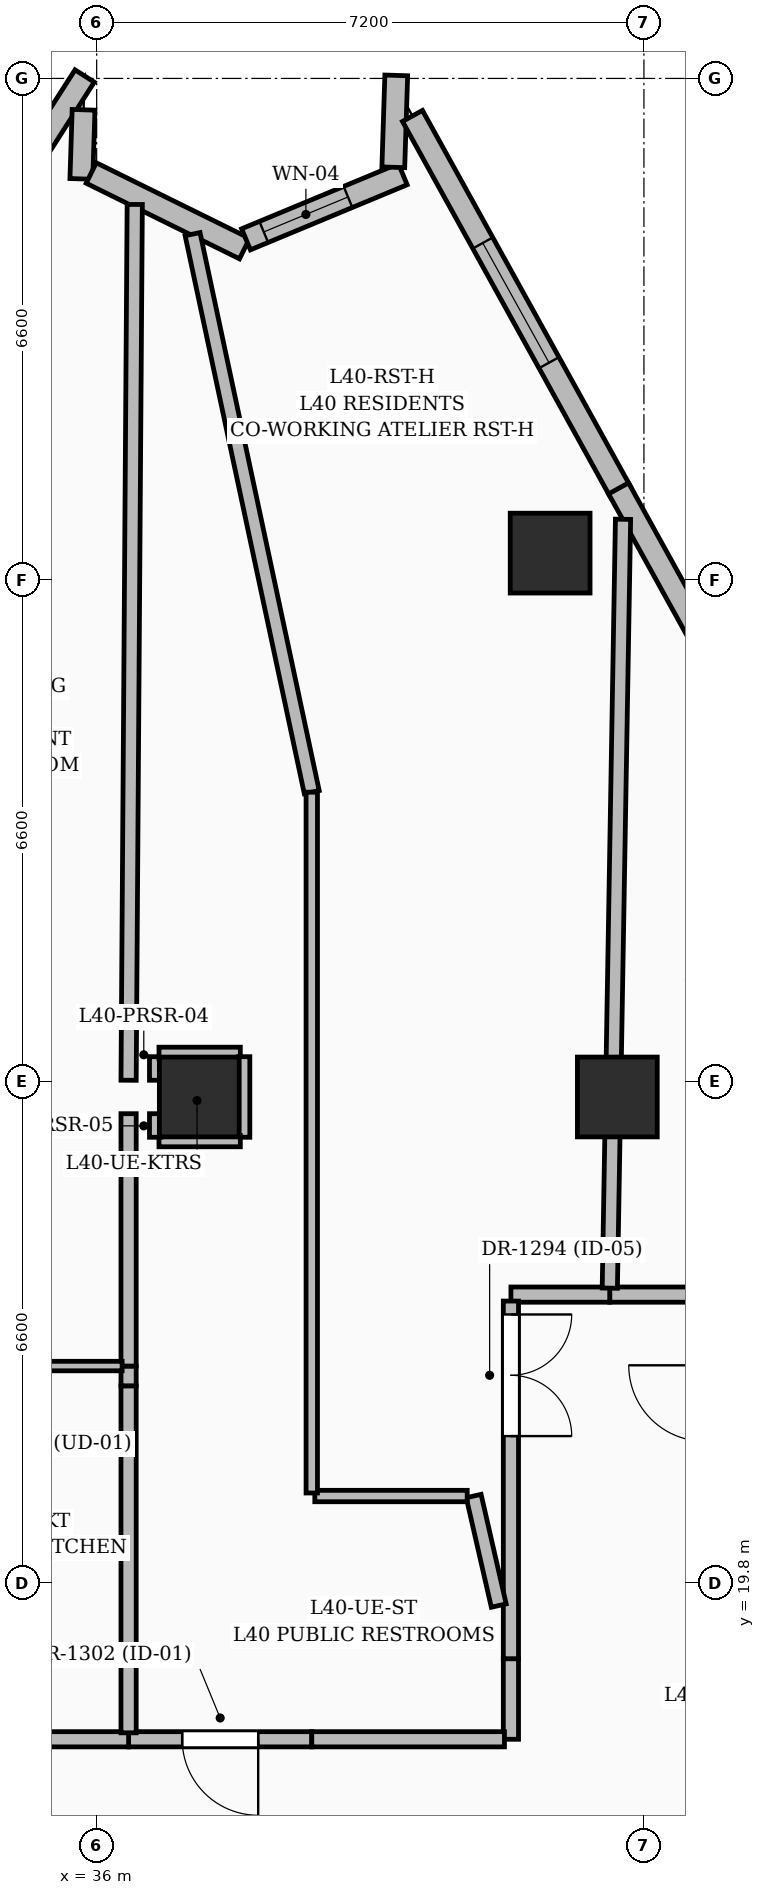
"""IFC4 building model, lengths in metres.
Left out: names, types, materials, properties, quantities, classifications, styles, units other than length and angle.
Written with IfcOpenShell. Run it as: python <this file> out.ifc"""

import sys

from ifc_helpers import new_model, si_unit, direction, frame, frame_2d, origin, origin_2d, place, context, subcontext, project, spatial, rectangle, extrude, element, fill, save


model = new_model("IFC4")
c1 = context("Model", 3, precision=1e-05, world=origin(), true_north=direction((0.0, 1.0)))
c2 = subcontext(c1, "Body", "Model", "MODEL_VIEW")
j1 = project(units=[si_unit("LENGTHUNIT", "METRE"), si_unit("PLANEANGLEUNIT", "RADIAN")], contexts=[c1])
p1 = place(None, origin())
s1 = spatial("IfcSite", under=j1, at=p1, CompositionType="ELEMENT")
p2 = place(p1, origin())
s2 = spatial("IfcBuilding", under=s1, at=p2, CompositionType="ELEMENT")
p3 = place(p2, frame((0.0, 0.0, 157.2)))
s3 = spatial("IfcBuildingStorey", under=s2, at=p3, CompositionType="ELEMENT", Elevation=157.2)
for number, where, z_axis, x_axis in (
    (1, (42.85, 26.2, 0.0), (0.0, 0.0, 1.0), (1.0, 0.0, 0.0)),
    (2, (37.35, 26.2, 0.0), (0.0, 0.0, 1.0), (1.0, 0.0, 0.0)),
    (3, (41.966, 33.355, 0.0), (0.0, 0.0, 1.0), (1.0, 0.0, 0.0)),
):
    element("IfcColumn", number, at=place(p3, frame(where, z_axis=z_axis, x_axis=x_axis)), inside=s3, PredefinedType="COLUMN", context=c2, shape_type="SweptSolid", body=[
        extrude(rectangle(XDim=1.05, YDim=1.05, at=origin_2d()), origin(), (0.0, 0.0, 1.0), 3.6),
    ])
p4 = place(p3, frame((32.455, 34.345, 0.0), z_axis=(0.0, 0.0, 1.0), x_axis=(0.539489448276, 0.841992360535, 0.0)))
e4 = element("IfcWall", 4, at=p4, inside=s3, PredefinedType="SOLIDWALL", context=c2, shape_type="SweptSolid", body=[
    extrude(rectangle(XDim=6.279, YDim=0.3, at=frame_2d((3.14, 0.0))), origin(), (0.0, 0.0, 1.0), 3.35),
])
p5 = place(p4, frame((1.85, 0.0, 0.55)))
e5 = element("IfcOpeningElement", 5, at=p5, cuts=e4, PredefinedType="OPENING", context=c2, shape_type="SweptSolid", body=[
    extrude(rectangle(XDim=1.6, YDim=2.2, at=frame_2d((0.8, 1.1))), frame((0.0, 0.16, 0.0), z_axis=(0.0, -1.0, 0.0), x_axis=(1.0, 0.0, 0.0)), (0.0, 0.0, 1.0), 0.32),
])
p6 = place(p3, frame((35.828, 39.187, 0.0), z_axis=(0.0, 0.0, 1.0), x_axis=(-0.031938584897, -0.999489833262, 0.0)))
e6 = element("IfcWall", 6, at=p6, inside=s3, PredefinedType="SOLIDWALL", context=c2, shape_type="SweptSolid", body=[
    extrude(rectangle(XDim=0.91, YDim=0.3, at=frame_2d((0.455, 0.0))), origin(), (0.0, 0.0, 1.0), 3.35),
])
p7 = place(p3, frame((35.928, 38.356, 0.0), z_axis=(0.0, 0.0, 1.0), x_axis=(0.896845505116, -0.442343915922, 0.0)))
e7 = element("IfcWall", 7, at=p7, inside=s3, PredefinedType="SOLIDWALL", context=c2, shape_type="SweptSolid", body=[
    extrude(rectangle(XDim=2.249, YDim=0.3, at=frame_2d((1.125, 0.0))), origin(), (0.0, 0.0, 1.0), 3.35),
])
p8 = place(p3, frame((37.965, 37.483, 0.0), z_axis=(0.0, 0.0, 1.0), x_axis=(0.923541991646, 0.383497313766, 0.0)))
e8 = element("IfcWall", 8, at=p8, inside=s3, PredefinedType="SOLIDWALL", context=c2, shape_type="SweptSolid", body=[
    extrude(rectangle(XDim=2.233, YDim=0.3, at=frame_2d((1.117, 0.0))), origin(), (0.0, 0.0, 1.0), 3.35),
])
p9 = place(p8, frame((0.253, 0.0, 0.8)))
e9 = element("IfcOpeningElement", 9, at=p9, cuts=e8, PredefinedType="OPENING", context=c2, shape_type="SweptSolid", body=[
    extrude(rectangle(XDim=1.2, YDim=1.8, at=frame_2d((0.6, 0.9))), frame((0.0, 0.16, 0.0), z_axis=(0.0, -1.0, 0.0), x_axis=(1.0, 0.0, 0.0)), (0.0, 0.0, 1.0), 0.32),
])
p10 = place(p3, frame((39.903, 38.431, 0.0), z_axis=(0.0, 0.0, 1.0), x_axis=(0.032091701063, 0.999484928712, 0.0)))
e10 = element("IfcWall", 10, at=p10, inside=s3, PredefinedType="SOLIDWALL", context=c2, shape_type="SweptSolid", body=[
    extrude(rectangle(XDim=1.21, YDim=0.3, at=frame_2d((0.605, 0.0))), origin(), (0.0, 0.0, 1.0), 3.35),
])
p11 = place(p3, frame((40.155, 39.106, 0.0), z_axis=(0.0, 0.0, 1.0), x_axis=(0.484204903903, -0.874954633702, 0.0)))
e11 = element("IfcWall", 11, at=p11, inside=s3, PredefinedType="SOLIDWALL", context=c2, shape_type="SweptSolid", body=[
    extrude(rectangle(XDim=5.653, YDim=0.3, at=frame_2d((2.827, 0.0))), origin(), (0.0, 0.0, 1.0), 3.35),
])
p12 = place(p11, frame((1.91, 0.0, 0.6)))
e12 = element("IfcOpeningElement", 12, at=p12, cuts=e11, PredefinedType="OPENING", context=c2, shape_type="SweptSolid", body=[
    extrude(rectangle(XDim=1.8, YDim=2.1, at=frame_2d((0.9, 1.05))), frame((0.0, 0.16, 0.0), z_axis=(0.0, -1.0, 0.0), x_axis=(1.0, 0.0, 0.0)), (0.0, 0.0, 1.0), 0.32),
])
p13 = place(p3, frame((42.866, 34.206, 0.0), z_axis=(0.0, 0.0, 1.0), x_axis=(0.484193476584, -0.874960957548, 0.0)))
e13 = element("IfcWall", 13, at=p13, inside=s3, PredefinedType="SOLIDWALL", context=c2, shape_type="SweptSolid", body=[
    extrude(rectangle(XDim=5.48, YDim=0.3, at=frame_2d((2.74, 0.0))), origin(), (0.0, 0.0, 1.0), 3.35),
])
p14 = place(p13, frame((2.245, 0.0, 0.55)))
e14 = element("IfcOpeningElement", 14, at=p14, cuts=e13, PredefinedType="OPENING", context=c2, shape_type="SweptSolid", body=[
    extrude(rectangle(XDim=1.6, YDim=2.2, at=frame_2d((0.8, 1.1))), frame((0.0, 0.16, 0.0), z_axis=(0.0, -1.0, 0.0), x_axis=(1.0, 0.0, 0.0)), (0.0, 0.0, 1.0), 0.32),
])
p15 = place(p3, frame((38.83, 17.75, 0.0), z_axis=(0.0, 0.0, 1.0), x_axis=(-1.0, 0.0, 0.0)))
e15 = element("IfcWall", 15, at=p15, inside=s3, PredefinedType="PARTITIONING", context=c2, shape_type="SweptSolid", body=[
    extrude(rectangle(XDim=2.41, YDim=0.2, at=frame_2d((1.205, 0.0))), origin(), (0.0, 0.0, 1.0), 3.35),
])
p16 = place(p15, frame((0.705, 0.0, 0.0)))
e16 = element("IfcOpeningElement", 16, at=p16, cuts=e15, PredefinedType="OPENING", context=c2, shape_type="SweptSolid", body=[
    extrude(rectangle(XDim=1.0, YDim=2.2, at=frame_2d((0.5, 1.1))), frame((0.0, 0.11, 0.0), z_axis=(0.0, -1.0, 0.0), x_axis=(1.0, 0.0, 0.0)), (0.0, 0.0, 1.0), 0.22),
])
p17 = place(p3, frame((41.45, 18.81, 0.0), z_axis=(0.0, 0.0, 1.0), x_axis=(0.0, -1.0, 0.0)))
e17 = element("IfcWall", 17, at=p17, inside=s3, PredefinedType="PARTITIONING", context=c2, shape_type="SweptSolid", body=[
    extrude(rectangle(XDim=1.06, YDim=0.2, at=frame_2d((0.53, 0.0))), origin(), (0.0, 0.0, 1.0), 3.35),
])
p18 = place(p3, frame((41.365, 17.75, 0.0), z_axis=(0.0, 0.0, 1.0), x_axis=(-1.0, 0.0, 0.0)))
e18 = element("IfcWall", 18, at=p18, inside=s3, PredefinedType="PARTITIONING", context=c2, shape_type="SweptSolid", body=[
    extrude(rectangle(XDim=2.535, YDim=0.2, at=frame_2d((1.268, 0.0))), origin(), (0.0, 0.0, 1.0), 3.35),
])
p19 = place(p3, frame((43.915, 23.6, 0.0), z_axis=(0.0, 0.0, 1.0), x_axis=(-1.0, 0.0, 0.0)))
e19 = element("IfcWall", 19, at=p19, inside=s3, PredefinedType="PARTITIONING", context=c2, shape_type="SweptSolid", body=[
    extrude(rectangle(XDim=1.165, YDim=0.2, at=frame_2d((0.583, 0.0))), origin(), (0.0, 0.0, 1.0), 2.436),
])
p20 = place(p3, frame((36.42, 17.75, 0.0), z_axis=(0.0, 0.0, 1.0), x_axis=(-1.0, 0.0, 0.0)))
e20 = element("IfcWall", 20, at=p20, inside=s3, PredefinedType="PARTITIONING", context=c2, shape_type="SweptSolid", body=[
    extrude(rectangle(XDim=2.8, YDim=0.2, at=frame_2d((1.4, 0.0))), origin(), (0.0, 0.0, 1.0), 2.436),
])
p21 = place(p3, frame((42.75, 23.6, 0.0), z_axis=(0.0, 0.0, 1.0), x_axis=(-1.0, 0.0, 0.0)))
e21 = element("IfcWall", 21, at=p21, inside=s3, PredefinedType="PARTITIONING", context=c2, shape_type="SweptSolid", body=[
    extrude(rectangle(XDim=1.3, YDim=0.2, at=frame_2d((0.65, 0.0))), origin(), (0.0, 0.0, 1.0), 3.35),
])
p22 = place(p3, frame((41.45, 23.515, 0.0), z_axis=(0.0, 0.0, 1.0), x_axis=(0.0, -1.0, 0.0)))
e22 = element("IfcWall", 22, at=p22, inside=s3, PredefinedType="PARTITIONING", context=c2, shape_type="SweptSolid", body=[
    extrude(rectangle(XDim=4.705, YDim=0.2, at=frame_2d((2.353, 0.0))), origin(), (0.0, 0.0, 1.0), 3.35),
])
p23 = place(p22, frame((0.176, 0.0, 0.0)))
e23 = element("IfcOpeningElement", 23, at=p23, cuts=e22, PredefinedType="OPENING", context=c2, shape_type="SweptSolid", body=[
    extrude(rectangle(XDim=1.6, YDim=2.3, at=frame_2d((0.8, 1.15))), frame((0.0, 0.11, 0.0), z_axis=(0.0, -1.0, 0.0), x_axis=(1.0, 0.0, 0.0)), (0.0, 0.0, 1.0), 0.22),
])
p24 = place(p3, frame((36.42, 22.4, 0.0), z_axis=(0.0, 0.0, 1.0), x_axis=(0.0, -1.0, 0.0)))
e24 = element("IfcWall", 24, at=p24, inside=s3, PredefinedType="PARTITIONING", context=c2, shape_type="SweptSolid", body=[
    extrude(rectangle(XDim=4.565, YDim=0.2, at=frame_2d((2.282, 0.0))), origin(), (0.0, 0.0, 1.0), 3.35),
])
p25 = place(p3, frame((36.42, 22.66, 0.0), z_axis=(0.0, 0.0, 1.0), x_axis=(0.0, -1.0, 0.0)))
e25 = element("IfcWall", 25, at=p25, inside=s3, PredefinedType="PARTITIONING", context=c2, shape_type="SweptSolid", body=[
    extrude(rectangle(XDim=0.26, YDim=0.2, at=frame_2d((0.13, 0.0))), origin(), (0.0, 0.0, 1.0), 3.35),
])
p26 = place(p3, frame((36.42, 25.98, 0.0), z_axis=(0.0, 0.0, 1.0), x_axis=(0.0, -1.0, 0.0)))
e26 = element("IfcWall", 26, at=p26, inside=s3, PredefinedType="PARTITIONING", context=c2, shape_type="SweptSolid", body=[
    extrude(rectangle(XDim=3.32, YDim=0.2, at=frame_2d((1.66, 0.0))), origin(), (0.0, 0.0, 1.0), 2.436),
])
p27 = place(p3, frame((36.501, 37.942, 0.0), z_axis=(0.0, 0.0, 1.0), x_axis=(-0.007034618495, -0.999975256765, 0.0)))
e27 = element("IfcWall", 27, at=p27, inside=s3, PredefinedType="PARTITIONING", context=c2, shape_type="SweptSolid", body=[
    extrude(rectangle(XDim=11.522, YDim=0.2, at=frame_2d((5.761, 0.0))), origin(), (0.0, 0.0, 1.0), 2.393),
])
p28 = place(p3, frame((38.83, 30.21, 0.0), z_axis=(0.0, 0.0, 1.0), x_axis=(-0.208896033751, 0.977937854407, 0.0)))
e28 = element("IfcWall", 28, at=p28, inside=s3, PredefinedType="PARTITIONING", context=c2, shape_type="SweptSolid", body=[
    extrude(rectangle(XDim=7.507, YDim=0.2, at=frame_2d((3.753, 0.0))), origin(), (0.0, 0.0, 1.0), 2.57),
])
p29 = place(p3, frame((41.29, 19.509, 0.0), z_axis=(0.0, 0.0, 1.0), x_axis=(-0.223291159638, 0.974751793036, 0.0)))
e29 = element("IfcWall", 29, at=p29, inside=s3, PredefinedType="PARTITIONING", context=c2, shape_type="SweptSolid", body=[
    extrude(rectangle(XDim=1.478, YDim=0.2, at=frame_2d((0.739, 0.0))), origin(), (0.0, 0.0, 1.0), 3.35),
])
p30 = place(p3, frame((42.925, 33.8, 0.0), z_axis=(0.0, 0.0, 1.0), x_axis=(-0.017206788201, -0.999851952261, 0.0)))
e30 = element("IfcWall", 30, at=p30, inside=s3, PredefinedType="PARTITIONING", context=c2, shape_type="SweptSolid", body=[
    extrude(rectangle(XDim=10.116, YDim=0.2, at=frame_2d((5.058, 0.0))), origin(), (0.0, 0.0, 1.0), 2.393),
])
p31 = place(p3, frame((36.335, 22.66, 0.0), z_axis=(0.0, 0.0, 1.0), x_axis=(-1.0, 0.0, 0.0)))
e31 = element("IfcWall", 31, at=p31, inside=s3, PredefinedType="PARTITIONING", context=c2, shape_type="SweptSolid", body=[
    extrude(rectangle(XDim=3.087, YDim=0.125, at=frame_2d((1.544, 0.0))), origin(), (0.0, 0.0, 1.0), 2.436),
])
p32 = place(p31, frame((0.991, 0.0, 0.0)))
e32 = element("IfcOpeningElement", 32, at=p32, cuts=e31, PredefinedType="OPENING", context=c2, shape_type="SweptSolid", body=[
    extrude(rectangle(XDim=0.95, YDim=2.2, at=frame_2d((0.475, 1.1))), frame((0.0, 0.072, 0.0), z_axis=(0.0, -1.0, 0.0), x_axis=(1.0, 0.0, 0.0)), (0.0, 0.0, 1.0), 0.145),
])
p33 = place(p3, frame((36.77, 26.42, 0.0), z_axis=(0.0, 0.0, 1.0), x_axis=(0.0, 1.0, 0.0)))
e33 = element("IfcWall", 33, at=p33, inside=s3, PredefinedType="PARTITIONING", context=c2, shape_type="SweptSolid", body=[
    extrude(rectangle(XDim=0.31, YDim=0.15, at=frame_2d((0.155, 0.0))), origin(), (0.0, 0.0, 1.0), 2.393),
])
p34 = place(p3, frame((36.82, 26.78, 0.0), z_axis=(0.0, 0.0, 1.0), x_axis=(1.0, 0.0, 0.0)))
e34 = element("IfcWall", 34, at=p34, inside=s3, PredefinedType="PARTITIONING", context=c2, shape_type="SweptSolid", body=[
    extrude(rectangle(XDim=1.07, YDim=0.15, at=frame_2d((0.535, 0.0))), origin(), (0.0, 0.0, 1.0), 2.393),
])
p35 = place(p3, frame((37.94, 26.73, 0.0), z_axis=(0.0, 0.0, 1.0), x_axis=(0.0, -1.0, 0.0)))
e35 = element("IfcWall", 35, at=p35, inside=s3, PredefinedType="PARTITIONING", context=c2, shape_type="SweptSolid", body=[
    extrude(rectangle(XDim=1.06, YDim=0.15, at=frame_2d((0.53, 0.0))), origin(), (0.0, 0.0, 1.0), 2.436),
])
p36 = place(p3, frame((37.89, 25.62, 0.0), z_axis=(0.0, 0.0, 1.0), x_axis=(-1.0, 0.0, 0.0)))
e36 = element("IfcWall", 36, at=p36, inside=s3, PredefinedType="PARTITIONING", context=c2, shape_type="SweptSolid", body=[
    extrude(rectangle(XDim=1.07, YDim=0.15, at=frame_2d((0.535, 0.0))), origin(), (0.0, 0.0, 1.0), 2.436),
])
p37 = place(p3, frame((36.77, 25.67, 0.0), z_axis=(0.0, 0.0, 1.0), x_axis=(0.0, 1.0, 0.0)))
e37 = element("IfcWall", 37, at=p37, inside=s3, PredefinedType="PARTITIONING", context=c2, shape_type="SweptSolid", body=[
    extrude(rectangle(XDim=0.31, YDim=0.15, at=frame_2d((0.155, 0.0))), origin(), (0.0, 0.0, 1.0), 3.35),
])
p38 = place(p3, frame((40.875, 20.95, 0.0), z_axis=(0.0, 0.0, 1.0), x_axis=(-1.0, 0.0, 0.0)))
e38 = element("IfcWall", 38, at=p38, inside=s3, PredefinedType="PARTITIONING", context=c2, shape_type="SweptSolid", body=[
    extrude(rectangle(XDim=2.005, YDim=0.15, at=frame_2d((1.002, 0.0))), origin(), (0.0, 0.0, 1.0), 3.35),
])
p39 = place(p3, frame((38.83, 20.99, 0.0), z_axis=(0.0, 0.0, 1.0), x_axis=(0.0, 1.0, 0.0)))
e39 = element("IfcWall", 39, at=p39, inside=s3, PredefinedType="PARTITIONING", context=c2, shape_type="SweptSolid", body=[
    extrude(rectangle(XDim=9.22, YDim=0.15, at=frame_2d((4.61, 0.0))), origin(), (0.0, 0.0, 1.0), 2.436),
])
p40 = place(p9, origin())
e40 = element("IfcWindow", 40, at=p40, inside=s3, PartitioningType="SINGLE_PANEL", PredefinedType="WINDOW", context=c2, shape_type="SweptSolid", body=[
    extrude(rectangle(XDim=1.2, YDim=1.8, at=frame_2d((0.6, 0.9))), frame((0.0, 0.03, 0.0), z_axis=(0.0, -1.0, 0.0), x_axis=(1.0, 0.0, 0.0)), (0.0, 0.0, 1.0), 0.06),
])
fill(e9, e40)
p41 = place(p12, origin())
e41 = element("IfcWindow", 41, at=p41, inside=s3, PartitioningType="SINGLE_PANEL", PredefinedType="WINDOW", context=c2, shape_type="SweptSolid", body=[
    extrude(rectangle(XDim=1.8, YDim=2.1, at=frame_2d((0.9, 1.05))), frame((0.0, 0.03, 0.0), z_axis=(0.0, -1.0, 0.0), x_axis=(1.0, 0.0, 0.0)), (0.0, 0.0, 1.0), 0.06),
])
fill(e12, e41)
p42 = place(p23, origin())
e42 = element("IfcDoor", 42, at=p42, inside=s3, OperationType="DOUBLE_DOOR_SINGLE_SWING", PredefinedType="DOOR", context=c2, shape_type="SweptSolid", body=[
    extrude(rectangle(XDim=1.6, YDim=2.3, at=frame_2d((0.8, 1.15))), frame((0.0, 0.025, 0.0), z_axis=(0.0, -1.0, 0.0), x_axis=(1.0, 0.0, 0.0)), (0.0, 0.0, 1.0), 0.05),
])
fill(e23, e42)
p43 = place(p16, origin())
e43 = element("IfcDoor", 43, at=p43, inside=s3, OperationType="SINGLE_SWING_LEFT", PredefinedType="DOOR", context=c2, shape_type="SweptSolid", body=[
    extrude(rectangle(XDim=1.0, YDim=2.2, at=frame_2d((0.5, 1.1))), frame((0.0, 0.025, 0.0), z_axis=(0.0, -1.0, 0.0), x_axis=(1.0, 0.0, 0.0)), (0.0, 0.0, 1.0), 0.05),
])
fill(e16, e43)
save(model, sys.argv[1])
